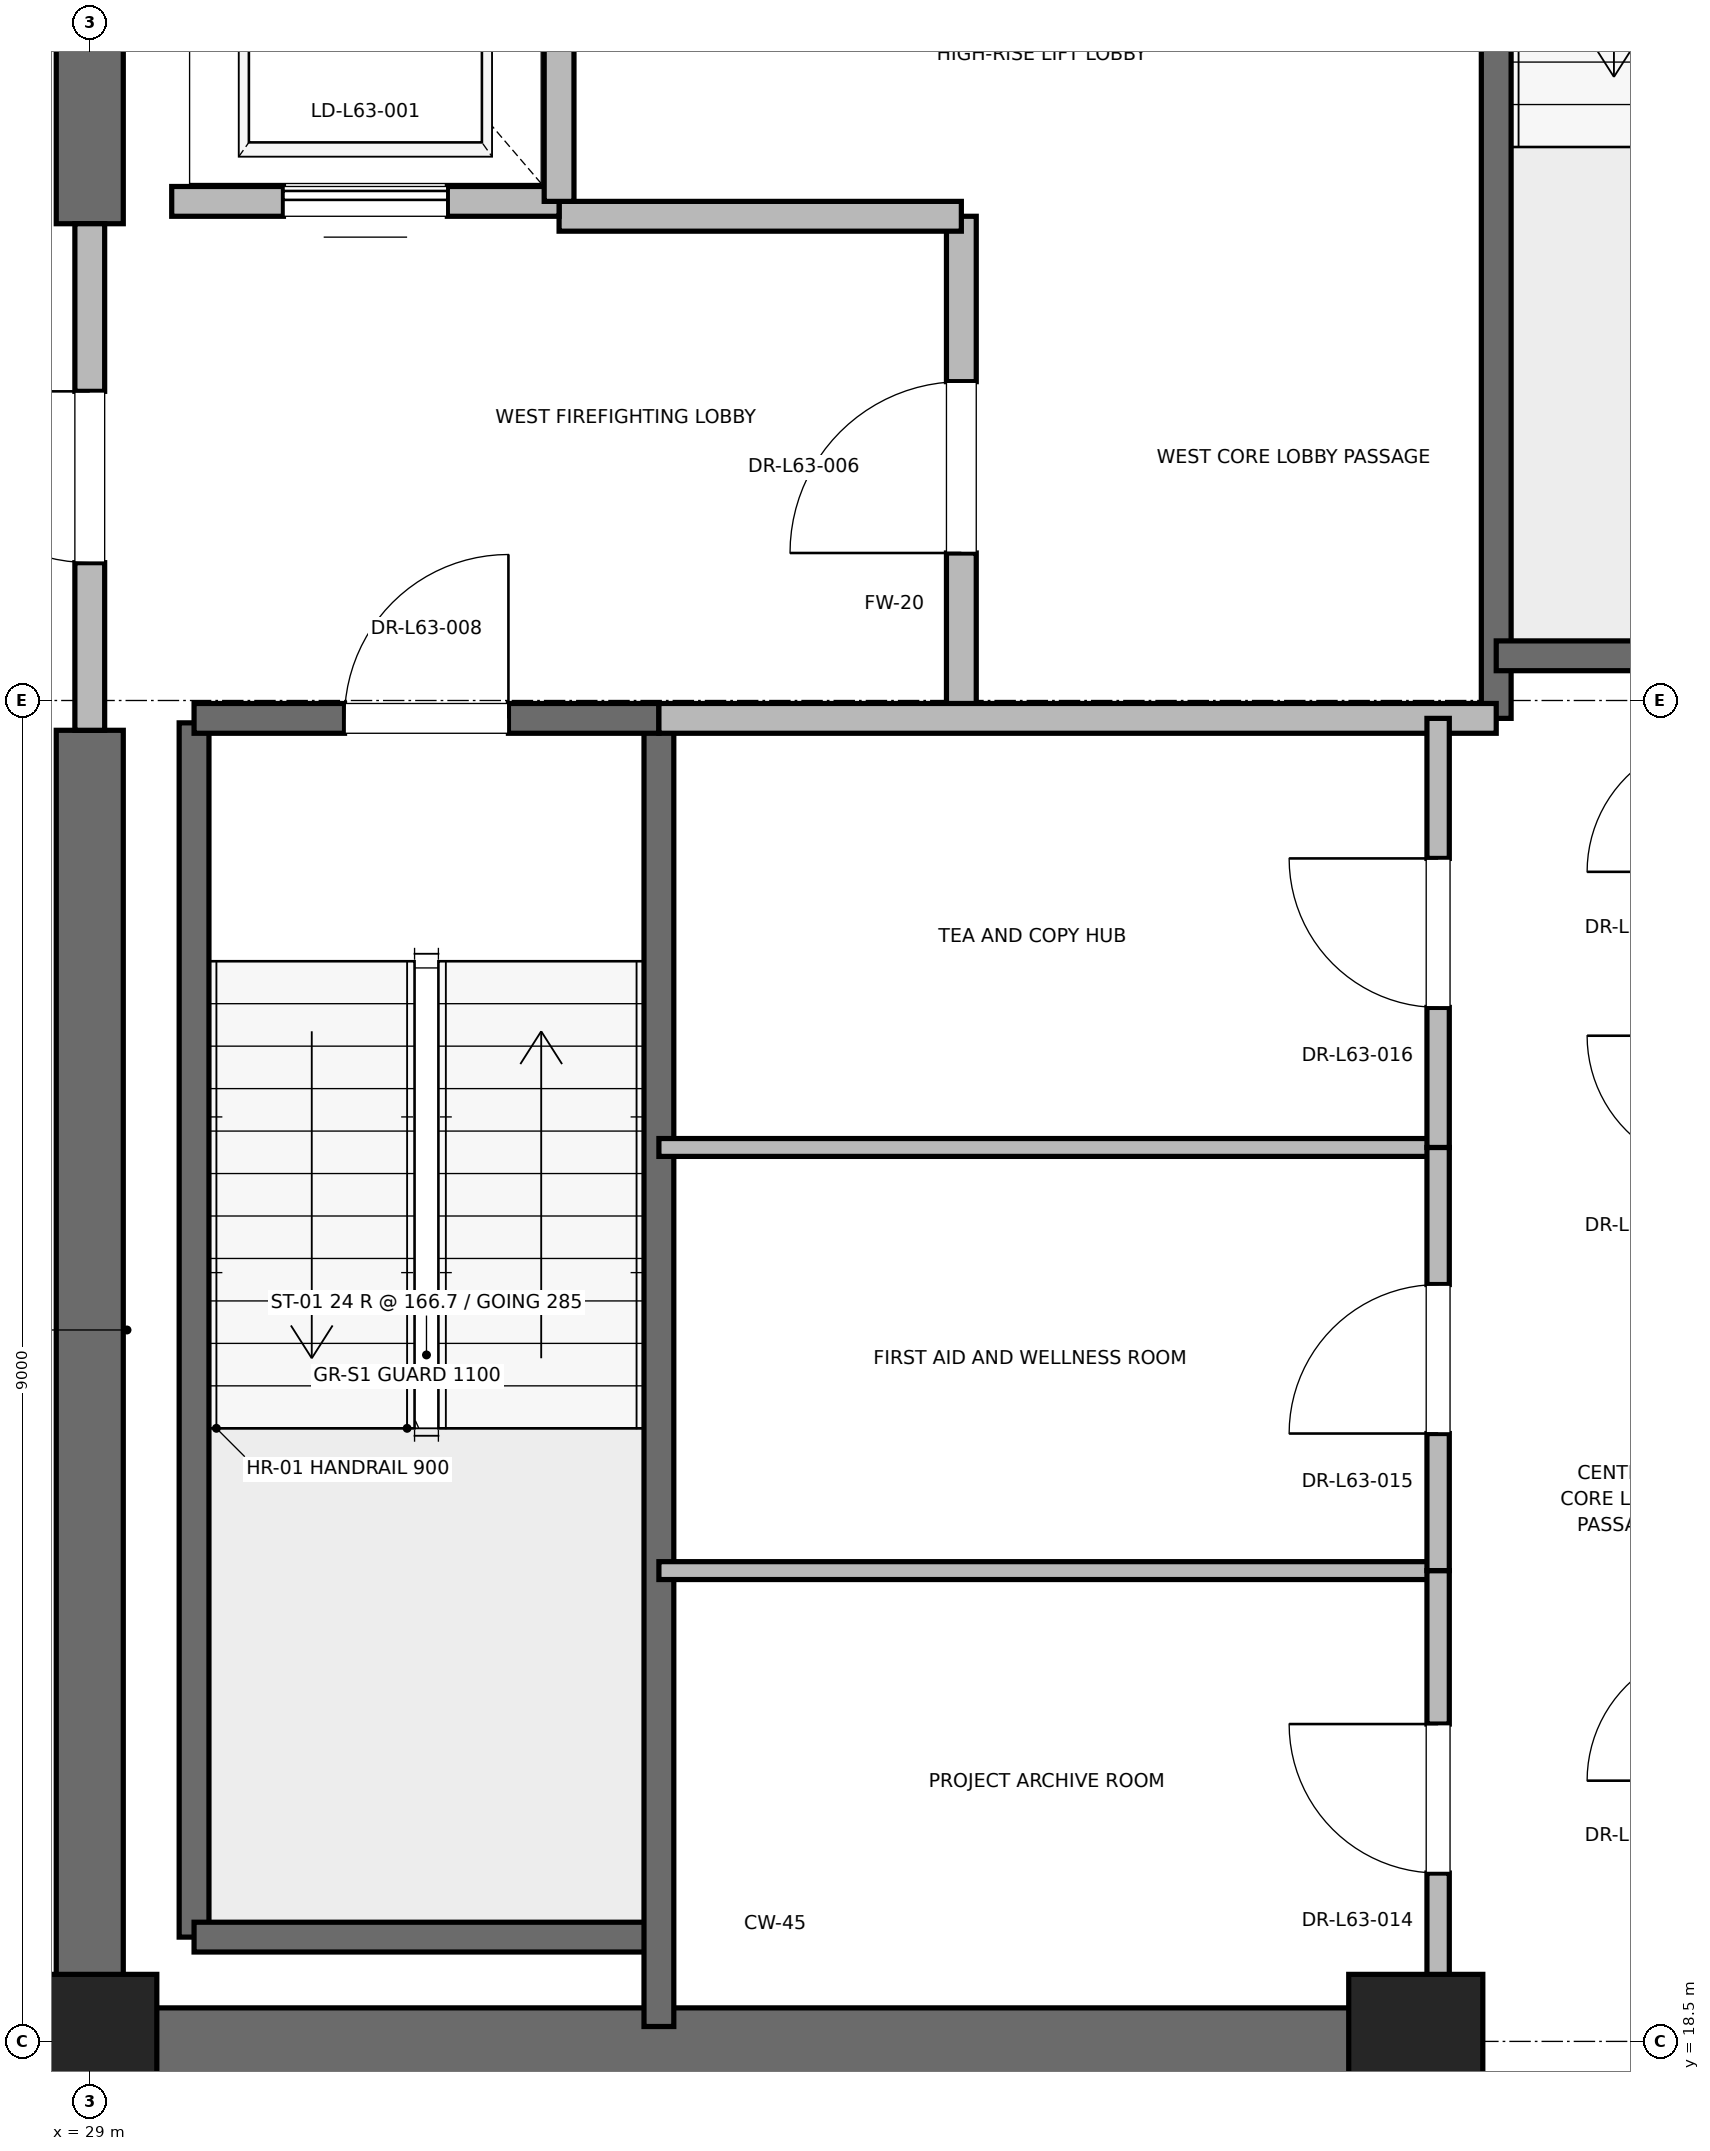
"""IFC4 building model, lengths in metres.
Left out: names, types, materials, properties, quantities, classifications, styles, units other than length and angle.
Written with IfcOpenShell. Run it as: python <this file> out.ifc"""

import sys

from ifc_helpers import new_model, si_unit, direction, frame, frame_2d, origin, origin_2d, place, context, subcontext, project, spatial, rectangle, extrude, element, fill, save


model = new_model("IFC4")
c1 = context("Model", 3, precision=1e-05, world=origin(), true_north=direction((0.0, 1.0)))
c2 = subcontext(c1, "Body", "Model", "MODEL_VIEW")
j1 = project(units=[si_unit("LENGTHUNIT", "METRE"), si_unit("PLANEANGLEUNIT", "RADIAN")], contexts=[c1])
p1 = place(None, origin())
s1 = spatial("IfcSite", under=j1, at=p1, CompositionType="ELEMENT")
p2 = place(p1, origin())
s2 = spatial("IfcBuilding", under=s1, at=p2, CompositionType="ELEMENT")
p3 = place(p2, frame((0.0, 0.0, 271.2)))
s3 = spatial("IfcBuildingStorey", under=s2, at=p3, CompositionType="ELEMENT", Elevation=271.2)
for number, where, z_axis, x_axis in (
    (1, (29.0, 18.5, 0.0), (0.0, 0.0, 1.0), (1.0, 0.0, 0.0)),
    (2, (37.9, 18.5, 0.0), (0.0, 0.0, 1.0), (1.0, 0.0, 0.0)),
):
    element("IfcColumn", number, at=place(p3, frame(where, z_axis=z_axis, x_axis=x_axis)), inside=s3, PredefinedType="PILASTER", context=c2, shape_type="SweptSolid", body=[
        extrude(rectangle(XDim=0.9, YDim=0.9, at=origin_2d()), origin(), (0.0, 0.0, 1.0), 4.0),
    ])
p4 = place(p3, frame((29.0, 18.5, 0.0), z_axis=(0.0, 0.0, 1.0), x_axis=(1.0, 0.0, 0.0)))
e3 = element("IfcWall", 3, at=p4, inside=s3, PredefinedType="SHEAR", context=c2, shape_type="SweptSolid", body=[
    extrude(rectangle(XDim=9.2, YDim=0.45, at=frame_2d((4.6, 0.0))), origin(), (0.0, 0.0, 1.0), 3.785),
])
p5 = place(p3, frame((29.0, 18.5, 0.0), z_axis=(0.0, 0.0, 1.0), x_axis=(0.0, 1.0, 0.0)))
e4 = element("IfcWall", 4, at=p5, inside=s3, PredefinedType="SHEAR", context=c2, shape_type="SweptSolid", body=[
    extrude(rectangle(XDim=8.8, YDim=0.45, at=frame_2d((4.4, 0.0))), origin(), (0.0, 0.0, 1.0), 3.785),
])
p6 = place(p3, frame((29.0, 30.7, 0.0), z_axis=(0.0, 0.0, 1.0), x_axis=(0.0, 1.0, 0.0)))
e5 = element("IfcWall", 5, at=p6, inside=s3, PredefinedType="SHEAR", context=c2, shape_type="SweptSolid", body=[
    extrude(rectangle(XDim=5.8, YDim=0.45, at=frame_2d((2.9, 0.0))), origin(), (0.0, 0.0, 1.0), 3.785),
])
p7 = place(p3, frame((29.7, 19.2, 0.0), z_axis=(0.0, 0.0, 1.0), x_axis=(0.0, 1.0, 0.0)))
e6 = element("IfcWall", 6, at=p7, inside=s3, PredefinedType="SOLIDWALL", context=c2, shape_type="SweptSolid", body=[
    extrude(rectangle(XDim=8.15, YDim=0.2, at=frame_2d((4.075, 0.0))), origin(), (0.0, 0.0, 1.0), 3.785),
])
p8 = place(p3, frame((29.7, 19.2, 0.0), z_axis=(0.0, 0.0, 1.0), x_axis=(1.0, 0.0, 0.0)))
e7 = element("IfcWall", 7, at=p8, inside=s3, PredefinedType="SOLIDWALL", context=c2, shape_type="SweptSolid", body=[
    extrude(rectangle(XDim=3.12, YDim=0.2, at=frame_2d((1.56, 0.0))), origin(), (0.0, 0.0, 1.0), 3.785),
])
p9 = place(p3, frame((32.82, 18.6, 0.0), z_axis=(0.0, 0.0, 1.0), x_axis=(0.0, 1.0, 0.0)))
e8 = element("IfcWall", 8, at=p9, inside=s3, PredefinedType="SOLIDWALL", context=c2, shape_type="SweptSolid", body=[
    extrude(rectangle(XDim=8.78, YDim=0.2, at=frame_2d((4.39, 0.0))), origin(), (0.0, 0.0, 1.0), 3.785),
])
p10 = place(p3, frame((29.7, 27.38, 0.0), z_axis=(0.0, 0.0, 1.0), x_axis=(1.0, 0.0, 0.0)))
e9 = element("IfcWall", 9, at=p10, inside=s3, PredefinedType="SOLIDWALL", context=c2, shape_type="SweptSolid", body=[
    extrude(rectangle(XDim=3.12, YDim=0.2, at=frame_2d((1.56, 0.0))), origin(), (0.0, 0.0, 1.0), 3.785),
])
p11 = place(p10, frame((1.01, 0.0, 0.0)))
e10 = element("IfcOpeningElement", 10, at=p11, cuts=e9, PredefinedType="OPENING", context=c2, shape_type="SweptSolid", body=[
    extrude(rectangle(XDim=1.1, YDim=2.15, at=frame_2d((0.55, 1.075))), frame((0.0, 0.1, 0.0), z_axis=(0.0, -1.0, 0.0), x_axis=(1.0, 0.0, 0.0)), (0.0, 0.0, 1.0), 0.2),
])
p12 = place(p3, frame((38.44, 27.38, 0.0), z_axis=(0.0, 0.0, 1.0), x_axis=(0.0, 1.0, 0.0)))
e11 = element("IfcWall", 11, at=p12, inside=s3, PredefinedType="SOLIDWALL", context=c2, shape_type="SweptSolid", body=[
    extrude(rectangle(XDim=8.87, YDim=0.2, at=frame_2d((4.435, 0.0))), origin(), (0.0, 0.0, 1.0), 3.785),
])
p13 = place(p3, frame((38.44, 27.8, 0.0), z_axis=(0.0, 0.0, 1.0), x_axis=(1.0, 0.0, 0.0)))
e12 = element("IfcWall", 12, at=p13, inside=s3, PredefinedType="SOLIDWALL", context=c2, shape_type="SweptSolid", body=[
    extrude(rectangle(XDim=3.32, YDim=0.2, at=frame_2d((1.66, 0.0))), origin(), (0.0, 0.0, 1.0), 3.785),
])
p14 = place(p3, frame((34.85, 27.38, 0.0), z_axis=(0.0, 0.0, 1.0), x_axis=(0.0, 1.0, 0.0)))
e13 = element("IfcWall", 13, at=p14, inside=s3, PredefinedType="PARTITIONING", context=c2, shape_type="SweptSolid", body=[
    extrude(rectangle(XDim=3.37, YDim=0.2, at=frame_2d((1.685, 0.0))), origin(), (0.0, 0.0, 1.0), 3.785),
])
p15 = place(p14, frame((1.11, 0.0, 0.0)))
e14 = element("IfcOpeningElement", 14, at=p15, cuts=e13, PredefinedType="OPENING", context=c2, shape_type="SweptSolid", body=[
    extrude(rectangle(XDim=1.15, YDim=2.2, at=frame_2d((0.575, 1.1))), frame((0.0, 0.1, 0.0), z_axis=(0.0, -1.0, 0.0), x_axis=(1.0, 0.0, 0.0)), (0.0, 0.0, 1.0), 0.2),
])
p16 = place(p3, frame((29.0, 27.3, 0.0), z_axis=(0.0, 0.0, 1.0), x_axis=(0.0, 1.0, 0.0)))
e15 = element("IfcWall", 15, at=p16, inside=s3, PredefinedType="PARTITIONING", context=c2, shape_type="SweptSolid", body=[
    extrude(rectangle(XDim=3.4, YDim=0.2, at=frame_2d((1.7, 0.0))), origin(), (0.0, 0.0, 1.0), 2.865),
])
p17 = place(p16, frame((1.125, 0.0, 0.0)))
e16 = element("IfcOpeningElement", 16, at=p17, cuts=e15, PredefinedType="OPENING", context=c2, shape_type="SweptSolid", body=[
    extrude(rectangle(XDim=1.15, YDim=2.2, at=frame_2d((0.575, 1.1))), frame((0.0, 0.1, 0.0), z_axis=(0.0, -1.0, 0.0), x_axis=(1.0, 0.0, 0.0)), (0.0, 0.0, 1.0), 0.2),
])
p18 = place(p3, frame((32.82, 27.38, 0.0), z_axis=(0.0, 0.0, 1.0), x_axis=(1.0, 0.0, 0.0)))
e17 = element("IfcWall", 17, at=p18, inside=s3, PredefinedType="PARTITIONING", context=c2, shape_type="SweptSolid", body=[
    extrude(rectangle(XDim=5.62, YDim=0.2, at=frame_2d((2.81, 0.0))), origin(), (0.0, 0.0, 1.0), 3.785),
])
p19 = place(p3, frame((32.15, 30.75, 0.0), z_axis=(0.0, 0.0, 1.0), x_axis=(1.0, 0.0, 0.0)))
e18 = element("IfcWall", 18, at=p19, inside=s3, PredefinedType="PARTITIONING", context=c2, shape_type="SweptSolid", body=[
    extrude(rectangle(XDim=2.7, YDim=0.2, at=frame_2d((1.35, 0.0))), origin(), (0.0, 0.0, 1.0), 3.785),
])
p20 = place(p3, frame((29.55, 30.85, 0.0), z_axis=(0.0, 0.0, 1.0), x_axis=(1.0, 0.0, 0.0)))
e19 = element("IfcWall", 19, at=p20, inside=s3, PredefinedType="SOLIDWALL", context=c2, shape_type="SweptSolid", body=[
    extrude(rectangle(XDim=2.6, YDim=0.2, at=frame_2d((1.3, 0.0))), origin(), (0.0, 0.0, 1.0), 2.865),
])
p21 = place(p20, frame((0.75, 0.0, 0.0)))
e20 = element("IfcOpeningElement", 20, at=p21, cuts=e19, PredefinedType="OPENING", context=c2, shape_type="SweptSolid", body=[
    extrude(rectangle(XDim=1.1, YDim=2.2, at=frame_2d((0.55, 1.1))), frame((0.0, 0.1, 0.0), z_axis=(0.0, -1.0, 0.0), x_axis=(1.0, 0.0, 0.0)), (0.0, 0.0, 1.0), 0.2),
])
p22 = place(p3, frame((32.15, 30.85, 0.0), z_axis=(0.0, 0.0, 1.0), x_axis=(0.0, 1.0, 0.0)))
e21 = element("IfcWall", 21, at=p22, inside=s3, PredefinedType="SOLIDWALL", context=c2, shape_type="SweptSolid", body=[
    extrude(rectangle(XDim=3.0, YDim=0.2, at=frame_2d((1.5, 0.0))), origin(), (0.0, 0.0, 1.0), 3.785),
])
for number, where, z_axis, x_axis in (
    (22, (32.82, 21.66, 0.0), (0.0, 0.0, 1.0), (1.0, 0.0, 0.0)),
    (23, (32.82, 24.5, 0.0), (0.0, 0.0, 1.0), (1.0, 0.0, 0.0)),
):
    element("IfcWall", number, at=place(p3, frame(where, z_axis=z_axis, x_axis=x_axis)), inside=s3, PredefinedType="PARTITIONING", context=c2, shape_type="SweptSolid", body=[
        extrude(rectangle(XDim=5.23, YDim=0.12, at=frame_2d((2.615, 0.0))), origin(), (0.0, 0.0, 1.0), 2.85),
    ])
p23 = place(p3, frame((38.05, 18.6, 0.0), z_axis=(0.0, 0.0, 1.0), x_axis=(0.0, 1.0, 0.0)))
e24 = element("IfcWall", 24, at=p23, inside=s3, PredefinedType="PARTITIONING", context=c2, shape_type="SweptSolid", body=[
    extrude(rectangle(XDim=3.06, YDim=0.15, at=frame_2d((1.53, 0.0))), origin(), (0.0, 0.0, 1.0), 2.85),
])
p24 = place(p23, frame((1.03, 0.0, 0.0)))
e25 = element("IfcOpeningElement", 25, at=p24, cuts=e24, PredefinedType="OPENING", context=c2, shape_type="SweptSolid", body=[
    extrude(rectangle(XDim=1.0, YDim=2.15, at=frame_2d((0.5, 1.075))), frame((0.0, 0.075, 0.0), z_axis=(0.0, -1.0, 0.0), x_axis=(1.0, 0.0, 0.0)), (0.0, 0.0, 1.0), 0.15),
])
p25 = place(p3, frame((38.05, 21.66, 0.0), z_axis=(0.0, 0.0, 1.0), x_axis=(0.0, 1.0, 0.0)))
e26 = element("IfcWall", 26, at=p25, inside=s3, PredefinedType="PARTITIONING", context=c2, shape_type="SweptSolid", body=[
    extrude(rectangle(XDim=2.84, YDim=0.15, at=frame_2d((1.42, 0.0))), origin(), (0.0, 0.0, 1.0), 2.85),
])
p26 = place(p25, frame((0.92, 0.0, 0.0)))
e27 = element("IfcOpeningElement", 27, at=p26, cuts=e26, PredefinedType="OPENING", context=c2, shape_type="SweptSolid", body=[
    extrude(rectangle(XDim=1.0, YDim=2.15, at=frame_2d((0.5, 1.075))), frame((0.0, 0.075, 0.0), z_axis=(0.0, -1.0, 0.0), x_axis=(1.0, 0.0, 0.0)), (0.0, 0.0, 1.0), 0.15),
])
p27 = place(p3, frame((38.05, 24.5, 0.0), z_axis=(0.0, 0.0, 1.0), x_axis=(0.0, 1.0, 0.0)))
e28 = element("IfcWall", 28, at=p27, inside=s3, PredefinedType="PARTITIONING", context=c2, shape_type="SweptSolid", body=[
    extrude(rectangle(XDim=2.88, YDim=0.15, at=frame_2d((1.44, 0.0))), origin(), (0.0, 0.0, 1.0), 2.85),
])
p28 = place(p27, frame((0.94, 0.0, 0.0)))
e29 = element("IfcOpeningElement", 29, at=p28, cuts=e28, PredefinedType="OPENING", context=c2, shape_type="SweptSolid", body=[
    extrude(rectangle(XDim=1.0, YDim=2.15, at=frame_2d((0.5, 1.075))), frame((0.0, 0.075, 0.0), z_axis=(0.0, -1.0, 0.0), x_axis=(1.0, 0.0, 0.0)), (0.0, 0.0, 1.0), 0.15),
])
p29 = place(p11, origin())
e30 = element("IfcDoor", 30, at=p29, inside=s3, OperationType="SINGLE_SWING_RIGHT", PredefinedType="DOOR", context=c2, shape_type="SweptSolid", body=[
    extrude(rectangle(XDim=1.1, YDim=2.15, at=frame_2d((0.55, 1.075))), frame((0.0, 0.025, 0.0), z_axis=(0.0, -1.0, 0.0), x_axis=(1.0, 0.0, 0.0)), (0.0, 0.0, 1.0), 0.05),
])
fill(e10, e30)
p30 = place(p15, origin())
e31 = element("IfcDoor", 31, at=p30, inside=s3, OperationType="SINGLE_SWING_LEFT", PredefinedType="DOOR", context=c2, shape_type="SweptSolid", body=[
    extrude(rectangle(XDim=1.15, YDim=2.2, at=frame_2d((0.575, 1.1))), frame((0.0, 0.025, 0.0), z_axis=(0.0, -1.0, 0.0), x_axis=(1.0, 0.0, 0.0)), (0.0, 0.0, 1.0), 0.05),
])
fill(e14, e31)
p31 = place(p17, origin())
e32 = element("IfcDoor", 32, at=p31, inside=s3, OperationType="SINGLE_SWING_RIGHT", PredefinedType="DOOR", context=c2, shape_type="SweptSolid", body=[
    extrude(rectangle(XDim=1.15, YDim=2.2, at=frame_2d((0.575, 1.1))), frame((0.0, 0.025, 0.0), z_axis=(0.0, -1.0, 0.0), x_axis=(1.0, 0.0, 0.0)), (0.0, 0.0, 1.0), 0.05),
])
fill(e16, e32)
p32 = place(p21, origin())
e33 = element("IfcDoor", 33, at=p32, inside=s3, OperationType="SLIDING_TO_RIGHT", PredefinedType="DOOR", context=c2, shape_type="SweptSolid", body=[
    extrude(rectangle(XDim=1.1, YDim=2.2, at=frame_2d((0.55, 1.1))), frame((0.0, 0.025, 0.0), z_axis=(0.0, -1.0, 0.0), x_axis=(1.0, 0.0, 0.0)), (0.0, 0.0, 1.0), 0.05),
])
fill(e20, e33)
p33 = place(p24, origin())
e34 = element("IfcDoor", 34, at=p33, inside=s3, OperationType="SINGLE_SWING_RIGHT", PredefinedType="DOOR", context=c2, shape_type="SweptSolid", body=[
    extrude(rectangle(XDim=1.0, YDim=2.15, at=frame_2d((0.5, 1.075))), frame((0.0, 0.025, 0.0), z_axis=(0.0, -1.0, 0.0), x_axis=(1.0, 0.0, 0.0)), (0.0, 0.0, 1.0), 0.05),
])
fill(e25, e34)
p34 = place(p26, origin())
e35 = element("IfcDoor", 35, at=p34, inside=s3, OperationType="SINGLE_SWING_LEFT", PredefinedType="DOOR", context=c2, shape_type="SweptSolid", body=[
    extrude(rectangle(XDim=1.0, YDim=2.15, at=frame_2d((0.5, 1.075))), frame((0.0, 0.025, 0.0), z_axis=(0.0, -1.0, 0.0), x_axis=(1.0, 0.0, 0.0)), (0.0, 0.0, 1.0), 0.05),
])
fill(e27, e35)
p35 = place(p28, origin())
e36 = element("IfcDoor", 36, at=p35, inside=s3, OperationType="SINGLE_SWING_RIGHT", PredefinedType="DOOR", context=c2, shape_type="SweptSolid", body=[
    extrude(rectangle(XDim=1.0, YDim=2.15, at=frame_2d((0.5, 1.075))), frame((0.0, 0.025, 0.0), z_axis=(0.0, -1.0, 0.0), x_axis=(1.0, 0.0, 0.0)), (0.0, 0.0, 1.0), 0.05),
])
fill(e29, e36)
save(model, sys.argv[1])
